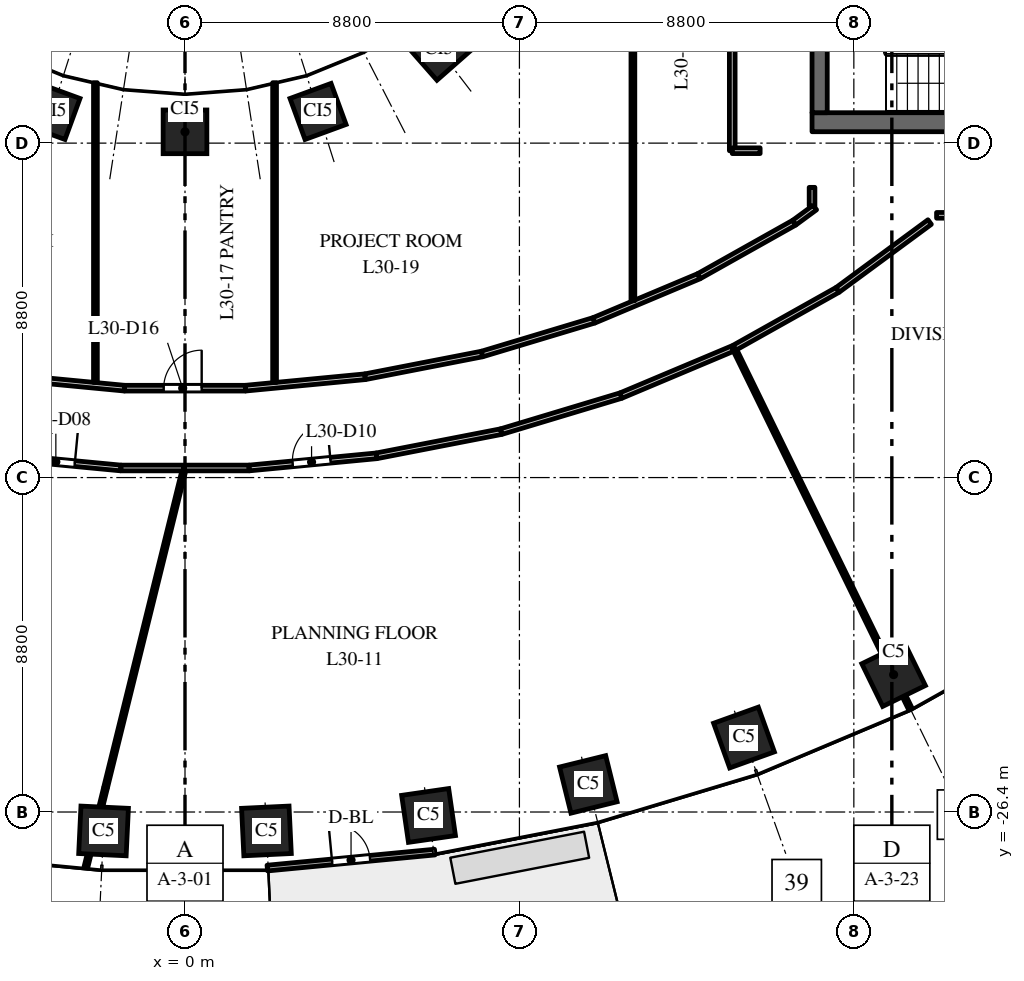
"""IFC4 building model, lengths in metres.
Left out: names, types, materials, properties, quantities, classifications, styles, units other than length and angle.
Written with IfcOpenShell. Run it as: python <this file> out.ifc"""

import sys

from ifc_helpers import new_model, si_unit, direction, frame, frame_2d, origin, origin_2d, place, context, subcontext, project, spatial, rectangle, extrude, element, fill, save


model = new_model("IFC4")
c1 = context("Model", 3, precision=1e-05, world=origin(), true_north=direction((0.0, 1.0)))
c2 = subcontext(c1, "Body", "Model", "MODEL_VIEW")
j1 = project(units=[si_unit("LENGTHUNIT", "METRE"), si_unit("PLANEANGLEUNIT", "RADIAN")], contexts=[c1])
p1 = place(None, origin())
s1 = spatial("IfcSite", under=j1, at=p1, CompositionType="ELEMENT")
p2 = place(p1, origin())
s2 = spatial("IfcBuilding", under=s1, at=p2, CompositionType="ELEMENT")
p3 = place(p2, frame((0.0, 0.0, 132.0)))
s3 = spatial("IfcBuildingStorey", under=s2, at=p3, CompositionType="ELEMENT", Elevation=132.0)
for number, where, z_axis, x_axis in (
    (1, (-2.143, -26.898, 0.0), (0.0, 0.0, 1.0), (0.999, -0.048, 0.0)),
    (2, (2.143, -26.898, 0.0), (0.0, 0.0, 1.0), (0.999, 0.048, 0.0)),
    (3, (6.409, -26.491, 0.0), (0.0, 0.0, 1.0), (0.99, 0.143, 0.0)),
    (4, (10.613, -25.674, 0.0), (0.0, 0.0, 1.0), (0.971, 0.24, 0.0)),
    (5, (14.709, -24.441, 0.0), (0.0, 0.0, 1.0), (0.941, 0.338, 0.0)),
    (6, (18.646, -22.785, 0.0), (0.0, 0.0, 1.0), (0.898, 0.439, 0.0)),
):
    element("IfcColumn", number, at=place(p3, frame(where, z_axis=z_axis, x_axis=x_axis)), inside=s3, PredefinedType="COLUMN", context=c2, shape_type="SweptSolid", body=[
        extrude(rectangle(XDim=1.25, YDim=1.25, at=origin_2d()), origin(), (0.0, 0.0, 1.0), 4.0),
    ])
for number, where, z_axis, x_axis in (
    (7, (-3.501, -7.967, 0.0), (0.0, 0.0, 1.0), (0.939, -0.344, 0.0)),
    (8, (0.0, -8.503, 0.0), (0.0, 0.0, 1.0), (1.0, 0.0, 0.0)),
    (9, (3.501, -7.967, 0.0), (0.0, 0.0, 1.0), (0.939, 0.344, 0.0)),
    (10, (6.682, -6.334, 0.0), (0.0, 0.0, 1.0), (0.751, 0.66, 0.0)),
):
    element("IfcColumn", number, at=place(p3, frame(where, z_axis=z_axis, x_axis=x_axis)), inside=s3, PredefinedType="COLUMN", context=c2, shape_type="SweptSolid", body=[
        extrude(rectangle(XDim=1.15, YDim=1.15, at=origin_2d()), origin(), (0.0, 0.0, 1.0), 4.0),
    ])
p4 = place(p3, frame((16.5, -8.25, 0.0), z_axis=(0.0, 0.0, 1.0), x_axis=(1.0, 0.0, 0.0)))
e11 = element("IfcWall", 11, at=p4, inside=s3, PredefinedType="SHEAR", context=c2, shape_type="SweptSolid", body=[
    extrude(rectangle(XDim=15.0, YDim=0.5, at=frame_2d((7.5, 0.0))), origin(), (0.0, 0.0, 1.0), 3.7),
])
p5 = place(p4, frame((6.9, 0.0, 0.0)))
e12 = element("IfcOpeningElement", 12, at=p5, cuts=e11, PredefinedType="OPENING", context=c2, shape_type="SweptSolid", body=[
    extrude(rectangle(XDim=1.2, YDim=2.1, at=frame_2d((0.6, 1.05))), frame((0.0, 0.26, 0.0), z_axis=(0.0, -1.0, 0.0), x_axis=(1.0, 0.0, 0.0)), (0.0, 0.0, 1.0), 0.52),
])
p6 = place(p4, frame((12.95, 0.0, 0.0)))
e13 = element("IfcOpeningElement", 13, at=p6, cuts=e11, PredefinedType="OPENING", context=c2, shape_type="SweptSolid", body=[
    extrude(rectangle(XDim=0.9, YDim=2.1, at=frame_2d((0.45, 1.05))), frame((0.0, 0.26, 0.0), z_axis=(0.0, -1.0, 0.0), x_axis=(1.0, 0.0, 0.0)), (0.0, 0.0, 1.0), 0.52),
])
p7 = place(p3, frame((16.7, -8.0, 0.0), z_axis=(0.0, 0.0, 1.0), x_axis=(0.0, 1.0, 0.0)))
e14 = element("IfcWall", 14, at=p7, inside=s3, PredefinedType="SHEAR", context=c2, shape_type="SweptSolid", body=[
    extrude(rectangle(XDim=16.0, YDim=0.4, at=frame_2d((8.0, 0.0))), origin(), (0.0, 0.0, 1.0), 3.7),
])
p8 = place(p3, frame((2.166, -27.875, 0.0), z_axis=(0.0, 0.0, 1.0), x_axis=(0.995473879823, 0.095035543824, 0.0)))
e15 = element("IfcWall", 15, at=p8, inside=s3, PredefinedType="STANDARD", context=c2, shape_type="SweptSolid", body=[
    extrude(rectangle(XDim=4.426, YDim=0.15, at=frame_2d((2.213, 0.0))), origin(), (0.0, 0.0, 1.0), 3.7),
])
p9 = place(p8, frame((1.713, 0.0, 0.0)))
e16 = element("IfcOpeningElement", 16, at=p9, cuts=e15, PredefinedType="OPENING", context=c2, shape_type="SweptSolid", body=[
    extrude(rectangle(XDim=1.0, YDim=2.4, at=frame_2d((0.5, 1.2))), frame((0.0, 0.085, 0.0), z_axis=(0.0, -1.0, 0.0), x_axis=(1.0, 0.0, 0.0)), (0.0, 0.0, 1.0), 0.17),
])
p10 = place(p3, frame((-5.041, -17.028, 0.0), z_axis=(0.0, 0.0, 1.0), x_axis=(0.99548178004, -0.094952754613, 0.0)))
e17 = element("IfcWall", 17, at=p10, inside=s3, PredefinedType="PARTITIONING", context=c2, shape_type="SweptSolid", body=[
    extrude(rectangle(XDim=3.368, YDim=0.15, at=frame_2d((1.684, 0.0))), origin(), (0.0, 0.0, 1.0), 3.7),
])
p11 = place(p10, frame((1.15, 0.0, 0.0)))
e18 = element("IfcOpeningElement", 18, at=p11, cuts=e17, PredefinedType="OPENING", context=c2, shape_type="SweptSolid", body=[
    extrude(rectangle(XDim=1.0, YDim=2.1, at=frame_2d((0.5, 1.05))), frame((0.0, 0.085, 0.0), z_axis=(0.0, -1.0, 0.0), x_axis=(1.0, 0.0, 0.0)), (0.0, 0.0, 1.0), 0.17),
])
p12 = place(p3, frame((-4.74, -14.947, 0.0), z_axis=(0.0, 0.0, 1.0), x_axis=(0.995467349369, -0.095103923894, 0.0)))
e19 = element("IfcWall", 19, at=p12, inside=s3, PredefinedType="PARTITIONING", context=c2, shape_type="SweptSolid", body=[
    extrude(rectangle(XDim=3.165, YDim=0.15, at=frame_2d((1.583, 0.0))), origin(), (0.0, 0.0, 1.0), 3.7),
])
p13 = place(p3, frame((-2.609, -27.858, 0.0), z_axis=(0.0, 0.0, 1.0), x_axis=(0.239863692272, 0.970806576579, 0.0)))
e20 = element("IfcWall", 20, at=p13, inside=s3, PredefinedType="PARTITIONING", context=c2, shape_type="SweptSolid", body=[
    extrude(rectangle(XDim=2.151, YDim=0.1, at=frame_2d((1.075, 0.0))), origin(), (0.0, 0.0, 1.0), 2.85),
])
p14 = place(p3, frame((-2.357, -15.096, 0.0), z_axis=(0.0, 0.0, 1.0), x_axis=(0.0, 1.0, 0.0)))
e21 = element("IfcWall", 21, at=p14, inside=s3, PredefinedType="PARTITIONING", context=c2, shape_type="SweptSolid", body=[
    extrude(rectangle(XDim=7.886, YDim=0.1, at=frame_2d((3.943, 0.0))), origin(), (0.0, 0.0, 1.0), 2.9),
])
p15 = place(p3, frame((-2.088, -25.749, 0.0), z_axis=(0.0, 0.0, 1.0), x_axis=(0.239779759728, 0.970827310506, 0.0)))
e22 = element("IfcWall", 22, at=p15, inside=s3, PredefinedType="PARTITIONING", context=c2, shape_type="SweptSolid", body=[
    extrude(rectangle(XDim=8.654, YDim=0.1, at=frame_2d((4.327, 0.0))), origin(), (0.0, 0.0, 1.0), 2.85),
])
p16 = place(p3, frame((-1.688, -17.348, 0.0), z_axis=(0.0, 0.0, 1.0), x_axis=(1.0, 0.0, 0.0)))
e23 = element("IfcWall", 23, at=p16, inside=s3, PredefinedType="PARTITIONING", context=c2, shape_type="SweptSolid", body=[
    extrude(rectangle(XDim=1.658, YDim=0.15, at=frame_2d((0.829, 0.0))), origin(), (0.0, 0.0, 1.0), 2.85),
])
p17 = place(p3, frame((-1.589, -15.248, 0.0), z_axis=(0.0, 0.0, 1.0), x_axis=(1.0, 0.0, 0.0)))
e24 = element("IfcWall", 24, at=p17, inside=s3, PredefinedType="PARTITIONING", context=c2, shape_type="SweptSolid", body=[
    extrude(rectangle(XDim=3.178, YDim=0.15, at=frame_2d((1.589, 0.0))), origin(), (0.0, 0.0, 1.0), 2.85),
])
p18 = place(p17, frame((1.028, 0.0, 0.0)))
e25 = element("IfcOpeningElement", 25, at=p18, cuts=e24, PredefinedType="OPENING", context=c2, shape_type="SweptSolid", body=[
    extrude(rectangle(XDim=1.0, YDim=2.1, at=frame_2d((0.5, 1.05))), frame((0.0, 0.085, 0.0), z_axis=(0.0, -1.0, 0.0), x_axis=(1.0, 0.0, 0.0)), (0.0, 0.0, 1.0), 0.17),
])
p19 = place(p3, frame((-0.013, -17.348, 0.0), z_axis=(0.0, 0.0, 1.0), x_axis=(1.0, 0.0, 0.0)))
e26 = element("IfcWall", 26, at=p19, inside=s3, PredefinedType="PARTITIONING", context=c2, shape_type="SweptSolid", body=[
    extrude(rectangle(XDim=1.701, YDim=0.15, at=frame_2d((0.851, 0.0))), origin(), (0.0, 0.0, 1.0), 3.7),
])
p20 = place(p3, frame((1.589, -15.248, 0.0), z_axis=(0.0, 0.0, 1.0), x_axis=(0.995467349369, 0.095103923894, 0.0)))
e27 = element("IfcWall", 27, at=p20, inside=s3, PredefinedType="PARTITIONING", context=c2, shape_type="SweptSolid", body=[
    extrude(rectangle(XDim=3.165, YDim=0.15, at=frame_2d((1.583, 0.0))), origin(), (0.0, 0.0, 1.0), 2.85),
])
p21 = place(p3, frame((1.688, -17.348, 0.0), z_axis=(0.0, 0.0, 1.0), x_axis=(0.99548178004, 0.094952754613, 0.0)))
e28 = element("IfcWall", 28, at=p21, inside=s3, PredefinedType="PARTITIONING", context=c2, shape_type="SweptSolid", body=[
    extrude(rectangle(XDim=3.368, YDim=0.15, at=frame_2d((1.684, 0.0))), origin(), (0.0, 0.0, 1.0), 2.85),
])
p22 = place(p21, frame((1.15, 0.0, 0.0)))
e29 = element("IfcOpeningElement", 29, at=p22, cuts=e28, PredefinedType="OPENING", context=c2, shape_type="SweptSolid", body=[
    extrude(rectangle(XDim=1.0, YDim=2.1, at=frame_2d((0.5, 1.05))), frame((0.0, 0.085, 0.0), z_axis=(0.0, -1.0, 0.0), x_axis=(1.0, 0.0, 0.0)), (0.0, 0.0, 1.0), 0.17),
])
p23 = place(p3, frame((2.357, -15.096, 0.0), z_axis=(0.0, 0.0, 1.0), x_axis=(0.0, 1.0, 0.0)))
e30 = element("IfcWall", 30, at=p23, inside=s3, PredefinedType="PARTITIONING", context=c2, shape_type="SweptSolid", body=[
    extrude(rectangle(XDim=7.886, YDim=0.1, at=frame_2d((3.943, 0.0))), origin(), (0.0, 0.0, 1.0), 2.85),
])
p24 = place(p3, frame((4.74, -14.947, 0.0), z_axis=(0.0, 0.0, 1.0), x_axis=(0.981627147181, 0.190809181955, 0.0)))
e31 = element("IfcWall", 31, at=p24, inside=s3, PredefinedType="PARTITIONING", context=c2, shape_type="SweptSolid", body=[
    extrude(rectangle(XDim=3.134, YDim=0.15, at=frame_2d((1.567, 0.0))), origin(), (0.0, 0.0, 1.0), 3.7),
])
p25 = place(p3, frame((5.041, -17.028, 0.0), z_axis=(0.0, 0.0, 1.0), x_axis=(0.981650748697, 0.190687722683, 0.0)))
e32 = element("IfcWall", 32, at=p25, inside=s3, PredefinedType="PARTITIONING", context=c2, shape_type="SweptSolid", body=[
    extrude(rectangle(XDim=3.34, YDim=0.15, at=frame_2d((1.67, 0.0))), origin(), (0.0, 0.0, 1.0), 3.7),
])
p26 = place(p3, frame((7.816, -14.349, 0.0), z_axis=(0.0, 0.0, 1.0), x_axis=(0.957609782402, 0.288068576292, 0.0)))
e33 = element("IfcWall", 33, at=p26, inside=s3, PredefinedType="PARTITIONING", context=c2, shape_type="SweptSolid", body=[
    extrude(rectangle(XDim=3.076, YDim=0.15, at=frame_2d((1.538, 0.0))), origin(), (0.0, 0.0, 1.0), 2.85),
])
p27 = place(p3, frame((8.32, -16.391, 0.0), z_axis=(0.0, 0.0, 1.0), x_axis=(0.957544199748, 0.288286499041, 0.0)))
e34 = element("IfcWall", 34, at=p27, inside=s3, PredefinedType="PARTITIONING", context=c2, shape_type="SweptSolid", body=[
    extrude(rectangle(XDim=3.293, YDim=0.15, at=frame_2d((1.646, 0.0))), origin(), (0.0, 0.0, 1.0), 2.85),
])
p28 = place(p3, frame((10.762, -13.463, 0.0), z_axis=(0.0, 0.0, 1.0), x_axis=(0.921848667289, 0.387550041438, 0.0)))
e35 = element("IfcWall", 35, at=p28, inside=s3, PredefinedType="PARTITIONING", context=c2, shape_type="SweptSolid", body=[
    extrude(rectangle(XDim=2.993, YDim=0.15, at=frame_2d((1.497, 0.0))), origin(), (0.0, 0.0, 1.0), 3.7),
])
p29 = place(p3, frame((11.473, -15.442, 0.0), z_axis=(0.0, 0.0, 1.0), x_axis=(0.921794929211, 0.387677841101, 0.0)))
e36 = element("IfcWall", 36, at=p29, inside=s3, PredefinedType="PARTITIONING", context=c2, shape_type="SweptSolid", body=[
    extrude(rectangle(XDim=3.224, YDim=0.15, at=frame_2d((1.612, 0.0))), origin(), (0.0, 0.0, 1.0), 3.7),
])
p30 = place(p3, frame((11.786, -12.947, 0.0), z_axis=(0.0, 0.0, 1.0), x_axis=(0.0, 1.0, 0.0)))
e37 = element("IfcWall", 37, at=p30, inside=s3, PredefinedType="PARTITIONING", context=c2, shape_type="SweptSolid", body=[
    extrude(rectangle(XDim=25.894, YDim=0.1, at=frame_2d((12.947, 0.0))), origin(), (0.0, 0.0, 1.0), 2.75),
])
p31 = place(p3, frame((13.521, -12.303, 0.0), z_axis=(0.0, 0.0, 1.0), x_axis=(0.871948863789, 0.489596955604, 0.0)))
e38 = element("IfcWall", 38, at=p31, inside=s3, PredefinedType="PARTITIONING", context=c2, shape_type="SweptSolid", body=[
    extrude(rectangle(XDim=2.88, YDim=0.15, at=frame_2d((1.44, 0.0))), origin(), (0.0, 0.0, 1.0), 3.7),
])
p32 = place(p3, frame((14.4, -9.0, 0.0), z_axis=(0.0, 0.0, 1.0), x_axis=(0.0, 1.0, 0.0)))
e39 = element("IfcWall", 39, at=p32, inside=s3, PredefinedType="PARTITIONING", context=c2, shape_type="SweptSolid", body=[
    extrude(rectangle(XDim=18.0, YDim=0.15, at=frame_2d((9.0, 0.0))), origin(), (0.0, 0.0, 1.0), 2.75),
])
p33 = place(p32, frame((8.6, 0.0, 0.0)))
e40 = element("IfcOpeningElement", 40, at=p33, cuts=e39, PredefinedType="OPENING", context=c2, shape_type="SweptSolid", body=[
    extrude(rectangle(XDim=1.0, YDim=2.1, at=frame_2d((0.5, 1.05))), frame((0.0, 0.085, 0.0), z_axis=(0.0, -1.0, 0.0), x_axis=(1.0, 0.0, 0.0)), (0.0, 0.0, 1.0), 0.17),
])
p34 = place(p3, frame((14.4, -9.0, 0.0), z_axis=(0.0, 0.0, 1.0), x_axis=(1.0, 0.0, 0.0)))
e41 = element("IfcWall", 41, at=p34, inside=s3, PredefinedType="PARTITIONING", context=c2, shape_type="SweptSolid", body=[
    extrude(rectangle(XDim=0.734, YDim=0.15, at=frame_2d((0.367, 0.0))), origin(), (0.0, 0.0, 1.0), 3.7),
])
p35 = place(p3, frame((14.447, -14.196, 0.0), z_axis=(0.0, 0.0, 1.0), x_axis=(0.439198109491, -0.898390238493, 0.0)))
e42 = element("IfcWall", 42, at=p35, inside=s3, PredefinedType="PARTITIONING", context=c2, shape_type="SweptSolid", body=[
    extrude(rectangle(XDim=10.562, YDim=0.1, at=frame_2d((5.281, 0.0))), origin(), (0.0, 0.0, 1.0), 2.9),
])
p36 = place(p3, frame((14.462, -14.182, 0.0), z_axis=(0.0, 0.0, 1.0), x_axis=(0.872130780857, 0.489272828882, 0.0)))
e43 = element("IfcWall", 43, at=p36, inside=s3, PredefinedType="PARTITIONING", context=c2, shape_type="SweptSolid", body=[
    extrude(rectangle(XDim=3.109, YDim=0.15, at=frame_2d((1.554, 0.0))), origin(), (0.0, 0.0, 1.0), 3.7),
])
p37 = place(p3, frame((16.032, -10.893, 0.0), z_axis=(0.0, 0.0, 1.0), x_axis=(0.805701862575, 0.592321288359, 0.0)))
e44 = element("IfcWall", 44, at=p37, inside=s3, PredefinedType="PARTITIONING", context=c2, shape_type="SweptSolid", body=[
    extrude(rectangle(XDim=0.674, YDim=0.15, at=frame_2d((0.337, 0.0))), origin(), (0.0, 0.0, 1.0), 3.7),
])
p38 = place(p3, frame((16.5, -10.456, 0.0), z_axis=(0.0, 0.0, 1.0), x_axis=(0.0, 1.0, 0.0)))
e45 = element("IfcWall", 45, at=p38, inside=s3, PredefinedType="PARTITIONING", context=c2, shape_type="SweptSolid", body=[
    extrude(rectangle(XDim=0.492, YDim=0.15, at=frame_2d((0.246, 0.0))), origin(), (0.0, 0.0, 1.0), 3.7),
])
p39 = place(p3, frame((17.173, -12.661, 0.0), z_axis=(0.0, 0.0, 1.0), x_axis=(0.805151708762, 0.593068904831, 0.0)))
e46 = element("IfcWall", 46, at=p39, inside=s3, PredefinedType="PARTITIONING", context=c2, shape_type="SweptSolid", body=[
    extrude(rectangle(XDim=3.008, YDim=0.15, at=frame_2d((1.504, 0.0))), origin(), (0.0, 0.0, 1.0), 3.7),
])
p40 = place(p3, frame((19.777, -10.7, 0.0), z_axis=(0.0, 0.0, 1.0), x_axis=(1.0, 0.0, 0.0)))
e47 = element("IfcWall", 47, at=p40, inside=s3, PredefinedType="PARTITIONING", context=c2, shape_type="SweptSolid", body=[
    extrude(rectangle(XDim=11.723, YDim=0.15, at=frame_2d((5.861, 0.0))), origin(), (0.0, 0.0, 1.0), 2.75),
])
p41 = place(p40, frame((5.4, 0.0, 0.0)))
e48 = element("IfcOpeningElement", 48, at=p41, cuts=e47, PredefinedType="OPENING", context=c2, shape_type="SweptSolid", body=[
    extrude(rectangle(XDim=1.0, YDim=2.1, at=frame_2d((0.5, 1.05))), frame((0.0, 0.085, 0.0), z_axis=(0.0, -1.0, 0.0), x_axis=(1.0, 0.0, 0.0)), (0.0, 0.0, 1.0), 0.17),
])
p42 = place(p9, origin())
e49 = element("IfcDoor", 49, at=p42, inside=s3, OperationType="SINGLE_SWING_LEFT", PredefinedType="DOOR", context=c2, shape_type="SweptSolid", body=[
    extrude(rectangle(XDim=1.0, YDim=2.4, at=frame_2d((0.5, 1.2))), frame((0.0, 0.025, 0.0), z_axis=(0.0, -1.0, 0.0), x_axis=(1.0, 0.0, 0.0)), (0.0, 0.0, 1.0), 0.05),
])
fill(e16, e49)
p43 = place(p11, origin())
e50 = element("IfcDoor", 50, at=p43, inside=s3, OperationType="SINGLE_SWING_RIGHT", PredefinedType="DOOR", context=c2, shape_type="SweptSolid", body=[
    extrude(rectangle(XDim=1.0, YDim=2.1, at=frame_2d((0.5, 1.05))), frame((0.0, 0.025, 0.0), z_axis=(0.0, -1.0, 0.0), x_axis=(1.0, 0.0, 0.0)), (0.0, 0.0, 1.0), 0.05),
])
fill(e18, e50)
p44 = place(p22, origin())
e51 = element("IfcDoor", 51, at=p44, inside=s3, OperationType="SINGLE_SWING_RIGHT", PredefinedType="DOOR", context=c2, shape_type="SweptSolid", body=[
    extrude(rectangle(XDim=1.0, YDim=2.1, at=frame_2d((0.5, 1.05))), frame((0.0, 0.025, 0.0), z_axis=(0.0, -1.0, 0.0), x_axis=(1.0, 0.0, 0.0)), (0.0, 0.0, 1.0), 0.05),
])
fill(e29, e51)
p45 = place(p18, origin())
e52 = element("IfcDoor", 52, at=p45, inside=s3, OperationType="SINGLE_SWING_RIGHT", PredefinedType="DOOR", context=c2, shape_type="SweptSolid", body=[
    extrude(rectangle(XDim=1.0, YDim=2.1, at=frame_2d((0.5, 1.05))), frame((0.0, 0.025, 0.0), z_axis=(0.0, -1.0, 0.0), x_axis=(1.0, 0.0, 0.0)), (0.0, 0.0, 1.0), 0.05),
])
fill(e25, e52)
save(model, sys.argv[1])
